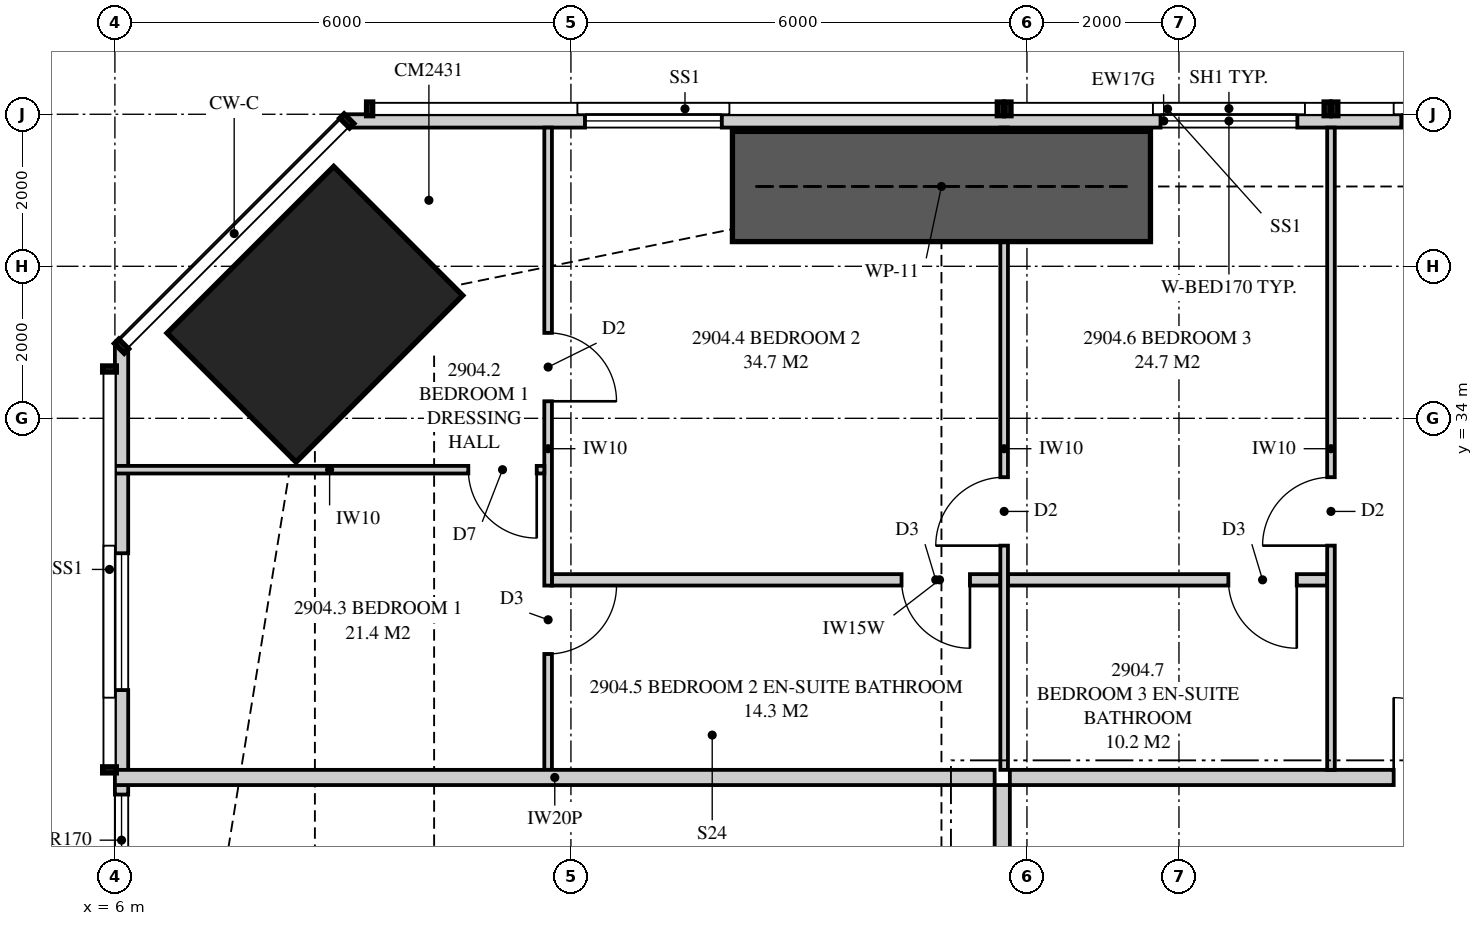
"""IFC4 building model, lengths in metres.
Left out: names, types, materials, properties, quantities, classifications, styles, units other than length and angle.
Written with IfcOpenShell. Run it as: python <this file> out.ifc"""

import sys

from ifc_helpers import new_model, si_unit, direction, frame, frame_2d, origin, origin_2d, place, context, subcontext, project, spatial, polyline, rectangle, outline, extrude, element, fill, save


model = new_model("IFC4")
c1 = context("Model", 3, precision=1e-05, world=origin(), true_north=direction((0.0, 1.0)))
c2 = subcontext(c1, "Body", "Model", "MODEL_VIEW")
j1 = project(units=[si_unit("LENGTHUNIT", "METRE"), si_unit("PLANEANGLEUNIT", "RADIAN")], contexts=[c1])
p1 = place(None, origin())
s1 = spatial("IfcSite", under=j1, at=p1, CompositionType="ELEMENT")
p2 = place(p1, origin())
s2 = spatial("IfcBuilding", under=s1, at=p2, CompositionType="ELEMENT")
p3 = place(p2, frame((0.0, 0.0, 108.2)))
s3 = spatial("IfcBuildingStorey", under=s2, at=p3, CompositionType="ELEMENT", Elevation=108.2)
p4 = place(p3, frame((8.631, 35.369, 0.0), z_axis=(0.0, 0.0, 1.0), x_axis=(0.707106781187, -0.707106781187, 0.0)))
e1 = element("IfcColumn", 1, at=p4, inside=s3, PredefinedType="COLUMN", context=c2, shape_type="SweptSolid", body=[
    extrude(rectangle(XDim=2.4, YDim=3.1, at=origin_2d()), origin(), (0.0, 0.0, 1.0), 3.35),
])
p5 = place(p3, frame((30.551, 37.913, 0.0), z_axis=(0.0, 0.0, 1.0), x_axis=(-1.0, 0.0, 0.0)))
e2 = element("IfcWall", 2, at=p5, inside=s3, PredefinedType="SOLIDWALL", context=c2, shape_type="SweptSolid", body=[
    extrude(outline(polyline([(0.0, 0.0), (21.499, 0.0), (21.499, 3.11), (13.879, 3.11), (13.879, 2.15), (13.834, 2.15), (13.834, 3.11), (13.676, 3.11), (13.676, 2.15), (0.0, 2.15), (0.0, 0.0)])), frame((0.0, 0.087, 0.0), z_axis=(0.0, -1.0, 0.0), x_axis=(1.0, 0.0, 0.0)), (0.0, 0.0, 1.0), 0.175),
])
p6 = place(p5, frame((5.826, 0.0, 0.4)))
e3 = element("IfcOpeningElement", 3, at=p6, cuts=e2, PredefinedType="OPENING", context=c2, shape_type="SweptSolid", body=[
    extrude(rectangle(XDim=1.8, YDim=1.7, at=frame_2d((0.9, 0.85))), frame((0.0, 0.097, 0.0), z_axis=(0.0, -1.0, 0.0), x_axis=(1.0, 0.0, 0.0)), (0.0, 0.0, 1.0), 0.195),
])
p7 = place(p5, frame((8.993, 0.0, 0.4)))
e4 = element("IfcOpeningElement", 4, at=p7, cuts=e2, PredefinedType="OPENING", context=c2, shape_type="SweptSolid", body=[
    extrude(rectangle(XDim=1.8, YDim=1.7, at=frame_2d((0.9, 0.85))), frame((0.0, 0.097, 0.0), z_axis=(0.0, -1.0, 0.0), x_axis=(1.0, 0.0, 0.0)), (0.0, 0.0, 1.0), 0.195),
])
p8 = place(p5, frame((16.566, 0.0, 0.4)))
e5 = element("IfcOpeningElement", 5, at=p8, cuts=e2, PredefinedType="OPENING", context=c2, shape_type="SweptSolid", body=[
    extrude(rectangle(XDim=1.8, YDim=1.7, at=frame_2d((0.9, 0.85))), frame((0.0, 0.097, 0.0), z_axis=(0.0, -1.0, 0.0), x_axis=(1.0, 0.0, 0.0)), (0.0, 0.0, 1.0), 0.195),
])
p9 = place(p3, frame((6.087, 34.949, 0.0), z_axis=(0.0, 0.0, 1.0), x_axis=(0.0, -1.0, 0.0)))
e6 = element("IfcWall", 6, at=p9, inside=s3, PredefinedType="SOLIDWALL", context=c2, shape_type="SweptSolid", body=[
    extrude(outline(polyline([(0.0, 0.0), (15.799, 0.0), (15.799, 2.15), (9.949, 2.15), (9.949, 3.11), (9.823, 3.11), (9.823, 2.15), (9.73, 2.15), (9.73, 3.11), (0.0, 3.11), (0.0, 0.0)])), frame((0.0, 0.087, 0.0), z_axis=(0.0, -1.0, 0.0), x_axis=(1.0, 0.0, 0.0)), (0.0, 0.0, 1.0), 0.175),
])
p10 = place(p9, frame((2.724, 0.0, 0.4)))
e7 = element("IfcOpeningElement", 7, at=p10, cuts=e6, PredefinedType="OPENING", context=c2, shape_type="SweptSolid", body=[
    extrude(rectangle(XDim=1.8, YDim=1.7, at=frame_2d((0.9, 0.85))), frame((0.0, 0.097, 0.0), z_axis=(0.0, -1.0, 0.0), x_axis=(1.0, 0.0, 0.0)), (0.0, 0.0, 1.0), 0.195),
])
p11 = place(p9, frame((5.899, 0.0, 0.4)))
e8 = element("IfcOpeningElement", 8, at=p11, cuts=e6, PredefinedType="OPENING", context=c2, shape_type="SweptSolid", body=[
    extrude(rectangle(XDim=1.2, YDim=1.7, at=frame_2d((0.6, 0.85))), frame((0.0, 0.097, 0.0), z_axis=(0.0, -1.0, 0.0), x_axis=(1.0, 0.0, 0.0)), (0.0, 0.0, 1.0), 0.195),
])
p12 = place(p9, frame((13.049, 0.0, 0.4)))
e9 = element("IfcOpeningElement", 9, at=p12, cuts=e6, PredefinedType="OPENING", context=c2, shape_type="SweptSolid", body=[
    extrude(rectangle(XDim=1.8, YDim=1.7, at=frame_2d((0.9, 0.85))), frame((0.0, 0.097, 0.0), z_axis=(0.0, -1.0, 0.0), x_axis=(1.0, 0.0, 0.0)), (0.0, 0.0, 1.0), 0.195),
])
p13 = place(p3, frame((17.775, 29.275, 0.0), z_axis=(0.0, 0.0, 1.0), x_axis=(1.0, 0.0, 0.0)))
e10 = element("IfcWall", 10, at=p13, inside=s3, PredefinedType="PARTITIONING", context=c2, shape_type="SweptSolid", body=[
    extrude(rectangle(XDim=9.188, YDim=0.2, at=frame_2d((4.594, 0.0))), origin(), (0.0, 0.0, 1.0), 3.11),
])
p14 = place(p13, frame((5.05, 0.0, 0.0)))
e11 = element("IfcOpeningElement", 11, at=p14, cuts=e10, PredefinedType="OPENING", context=c2, shape_type="SweptSolid", body=[
    extrude(rectangle(XDim=1.05, YDim=2.2, at=frame_2d((0.525, 1.1))), frame((0.0, 0.11, 0.0), z_axis=(0.0, -1.0, 0.0), x_axis=(1.0, 0.0, 0.0)), (0.0, 0.0, 1.0), 0.22),
])
p15 = place(p3, frame((11.7, 37.825, 0.0), z_axis=(0.0, 0.0, 1.0), x_axis=(0.0, -1.0, 0.0)))
e12 = element("IfcWall", 12, at=p15, inside=s3, PredefinedType="PARTITIONING", context=c2, shape_type="SweptSolid", body=[
    extrude(outline(polyline([(0.0, 0.0), (8.45, 0.0), (8.45, 3.11), (2.708, 3.11), (2.708, 2.15), (0.953, 2.15), (0.953, 3.11), (0.0, 3.11), (0.0, 0.0)])), frame((0.0, 0.05, 0.0), z_axis=(0.0, -1.0, 0.0), x_axis=(1.0, 0.0, 0.0)), (0.0, 0.0, 1.0), 0.1),
])
p16 = place(p15, frame((2.701, 0.0, 0.0)))
e13 = element("IfcOpeningElement", 13, at=p16, cuts=e12, PredefinedType="OPENING", context=c2, shape_type="SweptSolid", body=[
    extrude(rectangle(XDim=0.9, YDim=2.1, at=frame_2d((0.45, 1.05))), frame((0.0, 0.06, 0.0), z_axis=(0.0, -1.0, 0.0), x_axis=(1.0, 0.0, 0.0)), (0.0, 0.0, 1.0), 0.12),
])
p17 = place(p15, frame((6.025, 0.0, 0.0)))
e14 = element("IfcOpeningElement", 14, at=p17, cuts=e12, PredefinedType="OPENING", context=c2, shape_type="SweptSolid", body=[
    extrude(rectangle(XDim=0.9, YDim=2.1, at=frame_2d((0.45, 1.05))), frame((0.0, 0.06, 0.0), z_axis=(0.0, -1.0, 0.0), x_axis=(1.0, 0.0, 0.0)), (0.0, 0.0, 1.0), 0.12),
])
p18 = place(p3, frame((17.7, 37.825, 0.0), z_axis=(0.0, 0.0, 1.0), x_axis=(0.0, -1.0, 0.0)))
e15 = element("IfcWall", 15, at=p18, inside=s3, PredefinedType="PARTITIONING", context=c2, shape_type="SweptSolid", body=[
    extrude(outline(polyline([(1.635, 2.15), (0.0, 2.15), (0.0, 0.0), (8.45, 0.0), (8.45, 3.11), (1.635, 3.11), (1.635, 2.15)]), holes=[polyline([(1.021, 0.116), (0.529, 0.116), (0.529, 0.906), (1.021, 0.906), (1.021, 0.116)]), polyline([(1.021, 1.244), (0.529, 1.244), (0.529, 2.034), (1.021, 2.034), (1.021, 1.244)])]), frame((0.0, 0.05, 0.0), z_axis=(0.0, -1.0, 0.0), x_axis=(1.0, 0.0, 0.0)), (0.0, 0.0, 1.0), 0.1),
])
p19 = place(p18, frame((4.6, 0.0, 0.0)))
e16 = element("IfcOpeningElement", 16, at=p19, cuts=e15, PredefinedType="OPENING", context=c2, shape_type="SweptSolid", body=[
    extrude(rectangle(XDim=0.9, YDim=2.1, at=frame_2d((0.45, 1.05))), frame((0.0, 0.06, 0.0), z_axis=(0.0, -1.0, 0.0), x_axis=(1.0, 0.0, 0.0)), (0.0, 0.0, 1.0), 0.12),
])
p20 = place(p3, frame((22.0, 37.825, 0.0), z_axis=(0.0, 0.0, 1.0), x_axis=(0.0, -1.0, 0.0)))
e17 = element("IfcWall", 17, at=p20, inside=s3, PredefinedType="PARTITIONING", context=c2, shape_type="SweptSolid", body=[
    extrude(outline(polyline([(0.0, 0.0), (8.45, 0.0), (8.45, 3.11), (1.635, 3.11), (1.635, 2.15), (0.0, 2.15), (0.0, 3.11), (0.0, 0.0)])), frame((0.0, 0.05, 0.0), z_axis=(0.0, -1.0, 0.0), x_axis=(1.0, 0.0, 0.0)), (0.0, 0.0, 1.0), 0.1),
])
p21 = place(p20, frame((4.6, 0.0, 0.0)))
e18 = element("IfcOpeningElement", 18, at=p21, cuts=e17, PredefinedType="OPENING", context=c2, shape_type="SweptSolid", body=[
    extrude(rectangle(XDim=0.9, YDim=2.1, at=frame_2d((0.45, 1.05))), frame((0.0, 0.06, 0.0), z_axis=(0.0, -1.0, 0.0), x_axis=(1.0, 0.0, 0.0)), (0.0, 0.0, 1.0), 0.12),
])
p22 = place(p3, frame((6.0, 33.324, 0.0), z_axis=(0.0, 0.0, 1.0), x_axis=(1.0, 0.0, 0.0)))
e19 = element("IfcWall", 19, at=p22, inside=s3, PredefinedType="PARTITIONING", context=c2, shape_type="SweptSolid", body=[
    extrude(outline(polyline([(0.0, 0.0), (5.65, 0.0), (5.65, 3.11), (5.46, 3.11), (5.46, 2.51), (3.171, 2.51), (3.171, 2.15), (1.429, 2.15), (1.429, 3.11), (0.0, 3.11), (0.0, 0.0)])), frame((0.0, 0.05, 0.0), z_axis=(0.0, -1.0, 0.0), x_axis=(1.0, 0.0, 0.0)), (0.0, 0.0, 1.0), 0.1),
])
p23 = place(p22, frame((4.65, 0.0, 0.0)))
e20 = element("IfcOpeningElement", 20, at=p23, cuts=e19, PredefinedType="OPENING", context=c2, shape_type="SweptSolid", body=[
    extrude(rectangle(XDim=0.9, YDim=2.1, at=frame_2d((0.45, 1.05))), frame((0.0, 0.06, 0.0), z_axis=(0.0, -1.0, 0.0), x_axis=(1.0, 0.0, 0.0)), (0.0, 0.0, 1.0), 0.12),
])
p24 = place(p3, frame((11.75, 31.875, 0.0), z_axis=(0.0, 0.0, 1.0), x_axis=(1.0, 0.0, 0.0)))
e21 = element("IfcWall", 21, at=p24, inside=s3, PredefinedType="PLUMBINGWALL", context=c2, shape_type="SweptSolid", body=[
    extrude(outline(polyline([(0.0, 0.0), (5.9, 0.0), (5.9, 3.11), (5.438, 3.11), (5.438, 2.541), (4.812, 2.541), (4.812, 3.11), (0.0, 3.11), (0.0, 0.0)])), frame((0.0, 0.075, 0.0), z_axis=(0.0, -1.0, 0.0), x_axis=(1.0, 0.0, 0.0)), (0.0, 0.0, 1.0), 0.15),
])
p25 = place(p24, frame((4.6, 0.0, 0.0)))
e22 = element("IfcOpeningElement", 22, at=p25, cuts=e21, PredefinedType="OPENING", context=c2, shape_type="SweptSolid", body=[
    extrude(rectangle(XDim=0.9, YDim=2.1, at=frame_2d((0.45, 1.05))), frame((0.0, 0.085, 0.0), z_axis=(0.0, -1.0, 0.0), x_axis=(1.0, 0.0, 0.0)), (0.0, 0.0, 1.0), 0.17),
])
p26 = place(p3, frame((17.75, 31.875, 0.0), z_axis=(0.0, 0.0, 1.0), x_axis=(1.0, 0.0, 0.0)))
e23 = element("IfcWall", 23, at=p26, inside=s3, PredefinedType="PLUMBINGWALL", context=c2, shape_type="SweptSolid", body=[
    extrude(rectangle(XDim=4.2, YDim=0.15, at=frame_2d((2.1, 0.0))), origin(), (0.0, 0.0, 1.0), 3.11),
])
p27 = place(p26, frame((2.9, 0.0, 0.0)))
e24 = element("IfcOpeningElement", 24, at=p27, cuts=e23, PredefinedType="OPENING", context=c2, shape_type="SweptSolid", body=[
    extrude(rectangle(XDim=0.9, YDim=2.1, at=frame_2d((0.45, 1.05))), frame((0.0, 0.085, 0.0), z_axis=(0.0, -1.0, 0.0), x_axis=(1.0, 0.0, 0.0)), (0.0, 0.0, 1.0), 0.17),
])
p28 = place(p3, frame((6.0, 29.275, 0.0), z_axis=(0.0, 0.0, 1.0), x_axis=(1.0, 0.0, 0.0)))
e25 = element("IfcWall", 25, at=p28, inside=s3, PredefinedType="PARTITIONING", context=c2, shape_type="SweptSolid", body=[
    extrude(outline(polyline([(0.0, 0.0), (11.575, 0.0), (11.575, 3.11), (11.212, 3.11), (11.212, 2.541), (10.538, 2.541), (10.538, 3.11), (5.51, 3.11), (5.51, 2.51), (2.969, 2.51), (2.969, 2.541), (2.565, 2.541), (2.565, 2.15), (0.721, 2.15), (0.721, 3.11), (0.0, 3.11), (0.0, 0.0)])), frame((0.0, 0.1, 0.0), z_axis=(0.0, -1.0, 0.0), x_axis=(1.0, 0.0, 0.0)), (0.0, 0.0, 1.0), 0.2),
])
p29 = place(p3, frame((17.675, 22.9, 0.0), z_axis=(0.0, 0.0, 1.0), x_axis=(0.0, 1.0, 0.0)))
e26 = element("IfcWall", 26, at=p29, inside=s3, PredefinedType="PARTITIONING", context=c2, shape_type="SweptSolid", body=[
    extrude(outline(polyline([(0.0, 0.0), (6.275, 0.0), (6.275, 3.11), (3.862, 3.11), (3.862, 2.541), (3.188, 2.541), (3.188, 3.11), (0.0, 3.11), (0.0, 0.0)])), frame((0.0, 0.1, 0.0), z_axis=(0.0, -1.0, 0.0), x_axis=(1.0, 0.0, 0.0)), (0.0, 0.0, 1.0), 0.2),
])
p30 = place(p29, frame((2.238, 0.0, 0.0)))
e27 = element("IfcOpeningElement", 27, at=p30, cuts=e26, PredefinedType="OPENING", context=c2, shape_type="SweptSolid", body=[
    extrude(rectangle(XDim=1.8, YDim=2.1, at=frame_2d((0.9, 1.05))), frame((0.0, 0.11, 0.0), z_axis=(0.0, -1.0, 0.0), x_axis=(1.0, 0.0, 0.0)), (0.0, 0.0, 1.0), 0.22),
])
p31 = place(p3, frame((14.125, 37.05, 0.0), z_axis=(0.0, 0.0, 1.0), x_axis=(1.0, 0.0, 0.0)))
e28 = element("IfcWall", 28, at=p31, inside=s3, PredefinedType="SHEAR", context=c2, shape_type="SweptSolid", body=[
    extrude(rectangle(XDim=5.5, YDim=1.45, at=frame_2d((2.75, 0.0))), origin(), (0.0, 0.0, 1.0), 3.35),
])
p32 = place(p6, origin())
e29 = element("IfcWindow", 29, at=p32, inside=s3, PartitioningType="SINGLE_PANEL", PredefinedType="WINDOW", context=c2, shape_type="SweptSolid", body=[
    extrude(rectangle(XDim=1.8, YDim=1.7, at=frame_2d((0.9, 0.85))), frame((0.0, 0.03, 0.0), z_axis=(0.0, -1.0, 0.0), x_axis=(1.0, 0.0, 0.0)), (0.0, 0.0, 1.0), 0.06),
])
fill(e3, e29)
p33 = place(p7, origin())
e30 = element("IfcWindow", 30, at=p33, inside=s3, PartitioningType="SINGLE_PANEL", PredefinedType="WINDOW", context=c2, shape_type="SweptSolid", body=[
    extrude(rectangle(XDim=1.8, YDim=1.7, at=frame_2d((0.9, 0.85))), frame((0.0, 0.03, 0.0), z_axis=(0.0, -1.0, 0.0), x_axis=(1.0, 0.0, 0.0)), (0.0, 0.0, 1.0), 0.06),
])
fill(e4, e30)
p34 = place(p8, origin())
e31 = element("IfcWindow", 31, at=p34, inside=s3, PartitioningType="SINGLE_PANEL", PredefinedType="WINDOW", context=c2, shape_type="SweptSolid", body=[
    extrude(rectangle(XDim=1.8, YDim=1.7, at=frame_2d((0.9, 0.85))), frame((0.0, 0.03, 0.0), z_axis=(0.0, -1.0, 0.0), x_axis=(1.0, 0.0, 0.0)), (0.0, 0.0, 1.0), 0.06),
])
fill(e5, e31)
p35 = place(p10, origin())
e32 = element("IfcWindow", 32, at=p35, inside=s3, PartitioningType="SINGLE_PANEL", PredefinedType="WINDOW", context=c2, shape_type="SweptSolid", body=[
    extrude(rectangle(XDim=1.8, YDim=1.7, at=frame_2d((0.9, 0.85))), frame((0.0, 0.03, 0.0), z_axis=(0.0, -1.0, 0.0), x_axis=(1.0, 0.0, 0.0)), (0.0, 0.0, 1.0), 0.06),
])
fill(e7, e32)
p36 = place(p11, origin())
e33 = element("IfcWindow", 33, at=p36, inside=s3, PartitioningType="SINGLE_PANEL", PredefinedType="WINDOW", context=c2, shape_type="SweptSolid", body=[
    extrude(rectangle(XDim=1.2, YDim=1.7, at=frame_2d((0.6, 0.85))), frame((0.0, 0.03, 0.0), z_axis=(0.0, -1.0, 0.0), x_axis=(1.0, 0.0, 0.0)), (0.0, 0.0, 1.0), 0.06),
])
fill(e8, e33)
p37 = place(p14, origin())
e34 = element("IfcDoor", 34, at=p37, inside=s3, OperationType="SINGLE_SWING_LEFT", PredefinedType="DOOR", context=c2, shape_type="SweptSolid", body=[
    extrude(rectangle(XDim=1.05, YDim=2.2, at=frame_2d((0.525, 1.1))), frame((0.0, 0.025, 0.0), z_axis=(0.0, -1.0, 0.0), x_axis=(1.0, 0.0, 0.0)), (0.0, 0.0, 1.0), 0.05),
])
fill(e11, e34)
p38 = place(p23, frame((0.9, 0.0, 0.0), z_axis=(0.0, 0.0, 1.0), x_axis=(-1.0, 0.0, 0.0)))
e35 = element("IfcDoor", 35, at=p38, inside=s3, OperationType="SINGLE_SWING_LEFT", PredefinedType="DOOR", context=c2, shape_type="SweptSolid", body=[
    extrude(rectangle(XDim=0.9, YDim=2.1, at=frame_2d((0.45, 1.05))), frame((0.0, 0.025, 0.0), z_axis=(0.0, -1.0, 0.0), x_axis=(1.0, 0.0, 0.0)), (0.0, 0.0, 1.0), 0.05),
])
fill(e20, e35)
p39 = place(p16, origin())
e36 = element("IfcDoor", 36, at=p39, inside=s3, OperationType="SINGLE_SWING_RIGHT", PredefinedType="DOOR", context=c2, shape_type="SweptSolid", body=[
    extrude(rectangle(XDim=0.9, YDim=2.1, at=frame_2d((0.45, 1.05))), frame((0.0, 0.025, 0.0), z_axis=(0.0, -1.0, 0.0), x_axis=(1.0, 0.0, 0.0)), (0.0, 0.0, 1.0), 0.05),
])
fill(e13, e36)
p40 = place(p19, frame((0.9, 0.0, 0.0), z_axis=(0.0, 0.0, 1.0), x_axis=(-1.0, 0.0, 0.0)))
e37 = element("IfcDoor", 37, at=p40, inside=s3, OperationType="SINGLE_SWING_LEFT", PredefinedType="DOOR", context=c2, shape_type="SweptSolid", body=[
    extrude(rectangle(XDim=0.9, YDim=2.1, at=frame_2d((0.45, 1.05))), frame((0.0, 0.025, 0.0), z_axis=(0.0, -1.0, 0.0), x_axis=(1.0, 0.0, 0.0)), (0.0, 0.0, 1.0), 0.05),
])
fill(e16, e37)
p41 = place(p25, frame((0.9, 0.0, 0.0), z_axis=(0.0, 0.0, 1.0), x_axis=(-1.0, 0.0, 0.0)))
e38 = element("IfcDoor", 38, at=p41, inside=s3, OperationType="SINGLE_SWING_LEFT", PredefinedType="DOOR", context=c2, shape_type="SweptSolid", body=[
    extrude(rectangle(XDim=0.9, YDim=2.1, at=frame_2d((0.45, 1.05))), frame((0.0, 0.025, 0.0), z_axis=(0.0, -1.0, 0.0), x_axis=(1.0, 0.0, 0.0)), (0.0, 0.0, 1.0), 0.05),
])
fill(e22, e38)
p42 = place(p21, frame((0.9, 0.0, 0.0), z_axis=(0.0, 0.0, 1.0), x_axis=(-1.0, 0.0, 0.0)))
e39 = element("IfcDoor", 39, at=p42, inside=s3, OperationType="SINGLE_SWING_LEFT", PredefinedType="DOOR", context=c2, shape_type="SweptSolid", body=[
    extrude(rectangle(XDim=0.9, YDim=2.1, at=frame_2d((0.45, 1.05))), frame((0.0, 0.025, 0.0), z_axis=(0.0, -1.0, 0.0), x_axis=(1.0, 0.0, 0.0)), (0.0, 0.0, 1.0), 0.05),
])
fill(e18, e39)
p43 = place(p27, frame((0.9, 0.0, 0.0), z_axis=(0.0, 0.0, 1.0), x_axis=(-1.0, 0.0, 0.0)))
e40 = element("IfcDoor", 40, at=p43, inside=s3, OperationType="SINGLE_SWING_LEFT", PredefinedType="DOOR", context=c2, shape_type="SweptSolid", body=[
    extrude(rectangle(XDim=0.9, YDim=2.1, at=frame_2d((0.45, 1.05))), frame((0.0, 0.025, 0.0), z_axis=(0.0, -1.0, 0.0), x_axis=(1.0, 0.0, 0.0)), (0.0, 0.0, 1.0), 0.05),
])
fill(e24, e40)
p44 = place(p17, origin())
e41 = element("IfcDoor", 41, at=p44, inside=s3, OperationType="SINGLE_SWING_LEFT", PredefinedType="DOOR", context=c2, shape_type="SweptSolid", body=[
    extrude(rectangle(XDim=0.9, YDim=2.1, at=frame_2d((0.45, 1.05))), frame((0.0, 0.025, 0.0), z_axis=(0.0, -1.0, 0.0), x_axis=(1.0, 0.0, 0.0)), (0.0, 0.0, 1.0), 0.05),
])
fill(e14, e41)
save(model, sys.argv[1])
